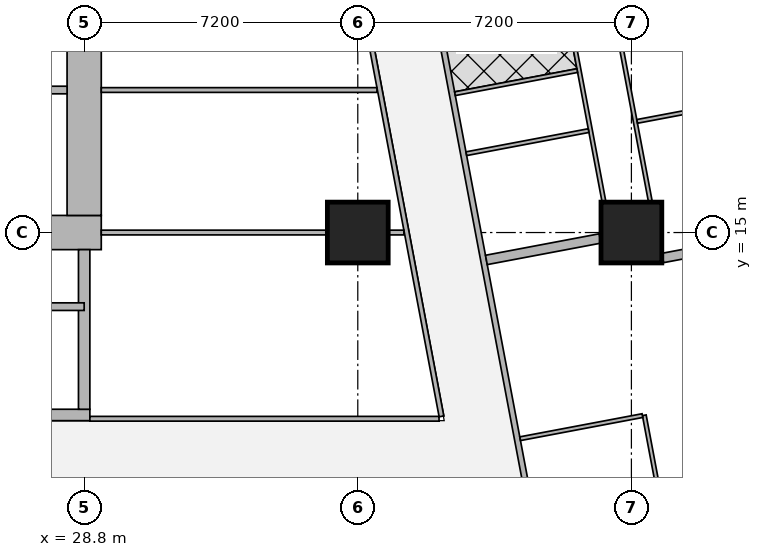
"""IFC4 building model, lengths in metres.
Left out: names, types, materials, properties, quantities, classifications, styles, units other than length and angle.
Written with IfcOpenShell. Run it as: python <this file> out.ifc"""

import sys

from ifc_helpers import new_model, si_unit, direction, frame, frame_2d, origin, origin_2d, place, context, subcontext, project, spatial, rectangle, extrude, element, fill, save


model = new_model("IFC4")
c1 = context("Model", 3, precision=1e-05, world=origin(), true_north=direction((0.0, 1.0)))
c2 = subcontext(c1, "Body", "Model", "MODEL_VIEW")
j1 = project(units=[si_unit("LENGTHUNIT", "METRE"), si_unit("PLANEANGLEUNIT", "RADIAN")], contexts=[c1])
p1 = place(None, origin())
s1 = spatial("IfcSite", under=j1, at=p1, CompositionType="ELEMENT")
p2 = place(p1, origin())
s2 = spatial("IfcBuilding", under=s1, at=p2, CompositionType="ELEMENT")
p3 = place(p2, frame((0.0, 0.0, 81.65)))
s3 = spatial("IfcBuildingStorey", under=s2, at=p3, CompositionType="ELEMENT", Elevation=81.65)
for number, where, z_axis, x_axis in (
    (1, (36.0, 15.0, 0.0), (0.0, 0.0, 1.0), (1.0, 0.0, 0.0)),
    (2, (43.2, 15.0, 0.0), (0.0, 0.0, 1.0), (1.0, 0.0, 0.0)),
):
    element("IfcColumn", number, at=place(p3, frame(where, z_axis=z_axis, x_axis=x_axis)), inside=s3, PredefinedType="COLUMN", context=c2, shape_type="SweptSolid", body=[
        extrude(rectangle(XDim=1.6, YDim=1.6, at=origin_2d()), origin(), (0.0, 0.0, 1.0), 3.75),
    ])
p4 = place(p3, frame((13.95, 15.0, 0.0), z_axis=(0.0, 0.0, 1.0), x_axis=(1.0, 0.0, 0.0)))
e3 = element("IfcWall", 3, at=p4, inside=s3, PredefinedType="SHEAR", context=c2, shape_type="SweptSolid", body=[
    extrude(rectangle(XDim=15.3, YDim=0.9, at=frame_2d((7.65, 0.0))), origin(), (0.0, 0.0, 1.0), 3.75),
])
p5 = place(p4, frame((4.45, 0.0, 0.0)))
e4 = element("IfcOpeningElement", 4, at=p5, cuts=e3, PredefinedType="OPENING", context=c2, shape_type="SweptSolid", body=[
    extrude(rectangle(XDim=1.8, YDim=2.1, at=frame_2d((0.9, 1.05))), frame((0.0, 0.46, 0.0), z_axis=(0.0, -1.0, 0.0), x_axis=(1.0, 0.0, 0.0)), (0.0, 0.0, 1.0), 0.92),
])
p6 = place(p4, frame((10.7, 0.0, 0.0)))
e5 = element("IfcOpeningElement", 5, at=p6, cuts=e3, PredefinedType="OPENING", context=c2, shape_type="SweptSolid", body=[
    extrude(rectangle(XDim=1.1, YDim=2.1, at=frame_2d((0.55, 1.05))), frame((0.0, 0.46, 0.0), z_axis=(0.0, -1.0, 0.0), x_axis=(1.0, 0.0, 0.0)), (0.0, 0.0, 1.0), 0.92),
])
p7 = place(p3, frame((28.8, 15.45, 0.0), z_axis=(0.0, 0.0, 1.0), x_axis=(0.0, 1.0, 0.0)))
e6 = element("IfcWall", 6, at=p7, inside=s3, PredefinedType="SHEAR", context=c2, shape_type="SweptSolid", body=[
    extrude(rectangle(XDim=14.1, YDim=0.9, at=frame_2d((7.05, 0.0))), origin(), (0.0, 0.0, 1.0), 3.75),
])
p8 = place(p3, frame((21.45, 10.2, 0.0), z_axis=(0.0, 0.0, 1.0), x_axis=(1.0, 0.0, 0.0)))
e7 = element("IfcWall", 7, at=p8, inside=s3, PredefinedType="SHEAR", context=c2, shape_type="SweptSolid", body=[
    extrude(rectangle(XDim=7.5, YDim=0.3, at=frame_2d((3.75, 0.0))), origin(), (0.0, 0.0, 1.0), 3.75),
])
p9 = place(p8, frame((0.5, 0.0, 0.0)))
e8 = element("IfcOpeningElement", 8, at=p9, cuts=e7, PredefinedType="OPENING", context=c2, shape_type="SweptSolid", body=[
    extrude(rectangle(XDim=1.1, YDim=2.1, at=frame_2d((0.55, 1.05))), frame((0.0, 0.16, 0.0), z_axis=(0.0, -1.0, 0.0), x_axis=(1.0, 0.0, 0.0)), (0.0, 0.0, 1.0), 0.32),
])
p10 = place(p3, frame((28.8, 10.35, 0.0), z_axis=(0.0, 0.0, 1.0), x_axis=(0.0, 1.0, 0.0)))
e9 = element("IfcWall", 9, at=p10, inside=s3, PredefinedType="SHEAR", context=c2, shape_type="SweptSolid", body=[
    extrude(rectangle(XDim=4.2, YDim=0.3, at=frame_2d((2.1, 0.0))), origin(), (0.0, 0.0, 1.0), 3.75),
])
p11 = place(p3, frame((50.653, 2.703, 0.0), z_axis=(0.0, 0.0, 1.0), x_axis=(-0.185612026696, 0.982623109613, 0.0)))
e10 = element("IfcWall", 10, at=p11, inside=s3, PredefinedType="SOLIDWALL", context=c2, shape_type="SweptSolid", body=[
    extrude(rectangle(XDim=41.393, YDim=0.2, at=frame_2d((20.697, 0.0))), origin(), (0.0, 0.0, 1.0), 3.5),
])
p12 = place(p11, frame((1.633, 0.0, 0.9)))
e11 = element("IfcOpeningElement", 11, at=p12, cuts=e10, PredefinedType="OPENING", context=c2, shape_type="SweptSolid", body=[
    extrude(rectangle(XDim=1.8, YDim=1.5, at=frame_2d((0.9, 0.75))), frame((0.0, 0.11, 0.0), z_axis=(0.0, -1.0, 0.0), x_axis=(1.0, 0.0, 0.0)), (0.0, 0.0, 1.0), 0.22),
])
p13 = place(p11, frame((6.032, 0.0, 0.9)))
e12 = element("IfcOpeningElement", 12, at=p13, cuts=e10, PredefinedType="OPENING", context=c2, shape_type="SweptSolid", body=[
    extrude(rectangle(XDim=1.8, YDim=1.5, at=frame_2d((0.9, 0.75))), frame((0.0, 0.11, 0.0), z_axis=(0.0, -1.0, 0.0), x_axis=(1.0, 0.0, 0.0)), (0.0, 0.0, 1.0), 0.22),
])
p14 = place(p11, frame((9.848, 0.0, 0.9)))
e13 = element("IfcOpeningElement", 13, at=p14, cuts=e10, PredefinedType="OPENING", context=c2, shape_type="SweptSolid", body=[
    extrude(rectangle(XDim=1.8, YDim=1.5, at=frame_2d((0.9, 0.75))), frame((0.0, 0.11, 0.0), z_axis=(0.0, -1.0, 0.0), x_axis=(1.0, 0.0, 0.0)), (0.0, 0.0, 1.0), 0.22),
])
p15 = place(p11, frame((13.664, 0.0, 0.9)))
e14 = element("IfcOpeningElement", 14, at=p15, cuts=e10, PredefinedType="OPENING", context=c2, shape_type="SweptSolid", body=[
    extrude(rectangle(XDim=1.8, YDim=1.5, at=frame_2d((0.9, 0.75))), frame((0.0, 0.11, 0.0), z_axis=(0.0, -1.0, 0.0), x_axis=(1.0, 0.0, 0.0)), (0.0, 0.0, 1.0), 0.22),
])
p16 = place(p11, frame((17.481, 0.0, 0.9)))
e15 = element("IfcOpeningElement", 15, at=p16, cuts=e10, PredefinedType="OPENING", context=c2, shape_type="SweptSolid", body=[
    extrude(rectangle(XDim=1.8, YDim=1.5, at=frame_2d((0.9, 0.75))), frame((0.0, 0.11, 0.0), z_axis=(0.0, -1.0, 0.0), x_axis=(1.0, 0.0, 0.0)), (0.0, 0.0, 1.0), 0.22),
])
p17 = place(p11, frame((21.297, 0.0, 0.9)))
e16 = element("IfcOpeningElement", 16, at=p17, cuts=e10, PredefinedType="OPENING", context=c2, shape_type="SweptSolid", body=[
    extrude(rectangle(XDim=1.8, YDim=1.5, at=frame_2d((0.9, 0.75))), frame((0.0, 0.11, 0.0), z_axis=(0.0, -1.0, 0.0), x_axis=(1.0, 0.0, 0.0)), (0.0, 0.0, 1.0), 0.22),
])
p18 = place(p11, frame((25.113, 0.0, 0.9)))
e17 = element("IfcOpeningElement", 17, at=p18, cuts=e10, PredefinedType="OPENING", context=c2, shape_type="SweptSolid", body=[
    extrude(rectangle(XDim=1.8, YDim=1.5, at=frame_2d((0.9, 0.75))), frame((0.0, 0.11, 0.0), z_axis=(0.0, -1.0, 0.0), x_axis=(1.0, 0.0, 0.0)), (0.0, 0.0, 1.0), 0.22),
])
p19 = place(p11, frame((28.93, 0.0, 0.9)))
e18 = element("IfcOpeningElement", 18, at=p19, cuts=e10, PredefinedType="OPENING", context=c2, shape_type="SweptSolid", body=[
    extrude(rectangle(XDim=1.8, YDim=1.5, at=frame_2d((0.9, 0.75))), frame((0.0, 0.11, 0.0), z_axis=(0.0, -1.0, 0.0), x_axis=(1.0, 0.0, 0.0)), (0.0, 0.0, 1.0), 0.22),
])
p20 = place(p11, frame((32.746, 0.0, 0.9)))
e19 = element("IfcOpeningElement", 19, at=p20, cuts=e10, PredefinedType="OPENING", context=c2, shape_type="SweptSolid", body=[
    extrude(rectangle(XDim=1.8, YDim=1.5, at=frame_2d((0.9, 0.75))), frame((0.0, 0.11, 0.0), z_axis=(0.0, -1.0, 0.0), x_axis=(1.0, 0.0, 0.0)), (0.0, 0.0, 1.0), 0.22),
])
p21 = place(p11, frame((36.481, 0.0, 0.9)))
e20 = element("IfcOpeningElement", 20, at=p21, cuts=e10, PredefinedType="OPENING", context=c2, shape_type="SweptSolid", body=[
    extrude(rectangle(XDim=1.8, YDim=1.5, at=frame_2d((0.9, 0.75))), frame((0.0, 0.11, 0.0), z_axis=(0.0, -1.0, 0.0), x_axis=(1.0, 0.0, 0.0)), (0.0, 0.0, 1.0), 0.22),
])
p22 = place(p3, frame((33.382, 45.65, 0.0), z_axis=(0.0, 0.0, 1.0), x_axis=(0.185593544777, -0.982626600565, 0.0)))
e21 = element("IfcWall", 21, at=p22, inside=s3, PredefinedType="SOLIDWALL", context=c2, shape_type="SweptSolid", body=[
    extrude(rectangle(XDim=47.118, YDim=0.15, at=frame_2d((23.559, 0.0))), origin(), (0.0, 0.0, 1.0), 2.2),
])
p23 = place(p22, frame((19.054, 0.0, 0.0)))
e22 = element("IfcOpeningElement", 22, at=p23, cuts=e21, PredefinedType="OPENING", context=c2, shape_type="SweptSolid", body=[
    extrude(rectangle(XDim=1.0, YDim=2.1, at=frame_2d((0.5, 1.05))), frame((0.0, 0.085, 0.0), z_axis=(0.0, -1.0, 0.0), x_axis=(1.0, 0.0, 0.0)), (0.0, 0.0, 1.0), 0.17),
])
p24 = place(p22, frame((22.87, 0.0, 0.0)))
e23 = element("IfcOpeningElement", 23, at=p24, cuts=e21, PredefinedType="OPENING", context=c2, shape_type="SweptSolid", body=[
    extrude(rectangle(XDim=1.0, YDim=2.1, at=frame_2d((0.5, 1.05))), frame((0.0, 0.085, 0.0), z_axis=(0.0, -1.0, 0.0), x_axis=(1.0, 0.0, 0.0)), (0.0, 0.0, 1.0), 0.17),
])
p25 = place(p22, frame((33.833, 0.0, 0.0)))
e24 = element("IfcOpeningElement", 24, at=p25, cuts=e21, PredefinedType="OPENING", context=c2, shape_type="SweptSolid", body=[
    extrude(rectangle(XDim=1.0, YDim=2.1, at=frame_2d((0.5, 1.05))), frame((0.0, 0.085, 0.0), z_axis=(0.0, -1.0, 0.0), x_axis=(1.0, 0.0, 0.0)), (0.0, 0.0, 1.0), 0.17),
])
p26 = place(p3, frame((42.566, 21.809, 0.0), z_axis=(0.0, 0.0, 1.0), x_axis=(0.18559218796, -0.982626856832, 0.0)))
e25 = element("IfcWall", 25, at=p26, inside=s3, PredefinedType="PARTITIONING", context=c2, shape_type="SweptSolid", body=[
    extrude(rectangle(XDim=6.105, YDim=0.1, at=frame_2d((3.052, 0.0))), origin(), (0.0, 0.0, 1.0), 2.5),
])
p27 = place(p26, frame((1.45, 0.0, 0.0)))
e26 = element("IfcOpeningElement", 26, at=p27, cuts=e25, PredefinedType="OPENING", context=c2, shape_type="SweptSolid", body=[
    extrude(rectangle(XDim=0.9, YDim=2.1, at=frame_2d((0.45, 1.05))), frame((0.0, 0.06, 0.0), z_axis=(0.0, -1.0, 0.0), x_axis=(1.0, 0.0, 0.0)), (0.0, 0.0, 1.0), 0.12),
])
p28 = place(p26, frame((4.163, 0.0, 0.0)))
e27 = element("IfcOpeningElement", 27, at=p28, cuts=e25, PredefinedType="OPENING", context=c2, shape_type="SweptSolid", body=[
    extrude(rectangle(XDim=0.9, YDim=2.1, at=frame_2d((0.45, 1.05))), frame((0.0, 0.06, 0.0), z_axis=(0.0, -1.0, 0.0), x_axis=(1.0, 0.0, 0.0)), (0.0, 0.0, 1.0), 0.12),
])
p29 = place(p3, frame((41.414, 21.442, 0.0), z_axis=(0.0, 0.0, 1.0), x_axis=(0.185636022079, -0.982618576716, 0.0)))
e28 = element("IfcWall", 28, at=p29, inside=s3, PredefinedType="PARTITIONING", context=c2, shape_type="SweptSolid", body=[
    extrude(rectangle(XDim=5.731, YDim=0.1, at=frame_2d((2.866, 0.0))), origin(), (0.0, 0.0, 1.0), 3.5),
])
p30 = place(p29, frame((0.655, 0.0, 0.0)))
e29 = element("IfcOpeningElement", 29, at=p30, cuts=e28, PredefinedType="OPENING", context=c2, shape_type="SweptSolid", body=[
    extrude(rectangle(XDim=0.9, YDim=2.1, at=frame_2d((0.45, 1.05))), frame((0.0, 0.06, 0.0), z_axis=(0.0, -1.0, 0.0), x_axis=(1.0, 0.0, 0.0)), (0.0, 0.0, 1.0), 0.12),
])
p31 = place(p29, frame((2.563, 0.0, 0.0)))
e30 = element("IfcOpeningElement", 30, at=p31, cuts=e28, PredefinedType="OPENING", context=c2, shape_type="SweptSolid", body=[
    extrude(rectangle(XDim=0.9, YDim=2.1, at=frame_2d((0.45, 1.05))), frame((0.0, 0.06, 0.0), z_axis=(0.0, -1.0, 0.0), x_axis=(1.0, 0.0, 0.0)), (0.0, 0.0, 1.0), 0.12),
])
p32 = place(p3, frame((47.527, 18.712, 0.0), z_axis=(0.0, 0.0, 1.0), x_axis=(-0.982665405803, -0.185387972203, 0.0)))
e31 = element("IfcWall", 31, at=p32, inside=s3, PredefinedType="PARTITIONING", context=c2, shape_type="SweptSolid", body=[
    extrude(rectangle(XDim=4.25, YDim=0.1, at=frame_2d((2.125, 0.0))), origin(), (0.0, 0.0, 1.0), 2.2),
])
p33 = place(p3, frame((42.073, 17.682, 0.0), z_axis=(0.0, 0.0, 1.0), x_axis=(-0.982610347627, -0.185679575441, 0.0)))
e32 = element("IfcWall", 32, at=p33, inside=s3, PredefinedType="PARTITIONING", context=c2, shape_type="SweptSolid", body=[
    extrude(rectangle(XDim=3.274, YDim=0.1, at=frame_2d((1.637, 0.0))), origin(), (0.0, 0.0, 1.0), 3.5),
])
p34 = place(p33, frame((1.2, 0.0, 0.0)))
e33 = element("IfcOpeningElement", 33, at=p34, cuts=e32, PredefinedType="OPENING", context=c2, shape_type="SweptSolid", body=[
    extrude(rectangle(XDim=0.9, YDim=2.1, at=frame_2d((0.45, 1.05))), frame((0.0, 0.06, 0.0), z_axis=(0.0, -1.0, 0.0), x_axis=(1.0, 0.0, 0.0)), (0.0, 0.0, 1.0), 0.12),
])
p35 = place(p3, frame((41.775, 19.261, 0.0), z_axis=(0.0, 0.0, 1.0), x_axis=(-0.982620626894, -0.185625169636, 0.0)))
e34 = element("IfcWall", 34, at=p35, inside=s3, PredefinedType="PARTITIONING", context=c2, shape_type="SweptSolid", body=[
    extrude(rectangle(XDim=3.275, YDim=0.1, at=frame_2d((1.637, 0.0))), origin(), (0.0, 0.0, 1.0), 3.5),
])
p36 = place(p3, frame((43.539, 10.192, 0.0), z_axis=(0.0, 0.0, 1.0), x_axis=(0.185366049966, -0.982669541362, 0.0)))
e35 = element("IfcWall", 35, at=p36, inside=s3, PredefinedType="PARTITIONING", context=c2, shape_type="SweptSolid", body=[
    extrude(rectangle(XDim=1.915, YDim=0.1, at=frame_2d((0.958, 0.0))), origin(), (0.0, 0.0, 1.0), 3.5),
])
p37 = place(p3, frame((43.49, 10.183, 0.0), z_axis=(0.0, 0.0, 1.0), x_axis=(-0.982607026909, -0.185697147715, 0.0)))
e36 = element("IfcWall", 36, at=p37, inside=s3, PredefinedType="PARTITIONING", context=c2, shape_type="SweptSolid", body=[
    extrude(rectangle(XDim=3.275, YDim=0.1, at=frame_2d((1.637, 0.0))), origin(), (0.0, 0.0, 1.0), 3.5),
])
p38 = place(p37, frame((1.2, 0.0, 0.0)))
e37 = element("IfcOpeningElement", 37, at=p38, cuts=e36, PredefinedType="OPENING", context=c2, shape_type="SweptSolid", body=[
    extrude(rectangle(XDim=0.9, YDim=2.1, at=frame_2d((0.45, 1.05))), frame((0.0, 0.06, 0.0), z_axis=(0.0, -1.0, 0.0), x_axis=(1.0, 0.0, 0.0)), (0.0, 0.0, 1.0), 0.12),
])
p39 = place(p3, frame((45.19, 14.55, 0.0), z_axis=(0.0, 0.0, 1.0), x_axis=(-0.982666604435, -0.185381618634, 0.0)))
e38 = element("IfcWall", 38, at=p39, inside=s3, PredefinedType="SOLIDWALL", context=c2, shape_type="SweptSolid", body=[
    extrude(rectangle(XDim=1.187, YDim=0.25, at=frame_2d((0.593, 0.0))), origin(), (0.0, 0.0, 1.0), 3.5),
])
p40 = place(p3, frame((42.376, 14.844, 0.0), z_axis=(0.0, 0.0, 1.0), x_axis=(-0.982636286056, -0.185542257522, 0.0)))
e39 = element("IfcWall", 39, at=p40, inside=s3, PredefinedType="SOLIDWALL", context=c2, shape_type="SweptSolid", body=[
    extrude(rectangle(XDim=3.045, YDim=0.25, at=frame_2d((1.522, 0.0))), origin(), (0.0, 0.0, 1.0), 3.5),
])
p41 = place(p3, frame((28.95, 10.1, 0.0), z_axis=(0.0, 0.0, 1.0), x_axis=(1.0, 0.0, 0.0)))
e40 = element("IfcWall", 40, at=p41, inside=s3, PredefinedType="PARTITIONING", context=c2, shape_type="SweptSolid", body=[
    extrude(rectangle(XDim=9.188, YDim=0.125, at=frame_2d((4.594, 0.0))), origin(), (0.0, 0.0, 1.0), 3.5),
])
p42 = place(p3, frame((38.202, 10.163, 0.0), z_axis=(0.0, 0.0, 1.0), x_axis=(-0.185645577403, 0.982616771479, 0.0)))
e41 = element("IfcWall", 41, at=p42, inside=s3, PredefinedType="PARTITIONING", context=c2, shape_type="SweptSolid", body=[
    extrude(rectangle(XDim=12.555, YDim=0.125, at=frame_2d((6.278, 0.0))), origin(), (0.0, 0.0, 1.0), 2.5),
])
p43 = place(p42, frame((0.708, 0.0, 0.0)))
e42 = element("IfcOpeningElement", 42, at=p43, cuts=e41, PredefinedType="OPENING", context=c2, shape_type="SweptSolid", body=[
    extrude(rectangle(XDim=1.0, YDim=2.1, at=frame_2d((0.5, 1.05))), frame((0.0, 0.073, 0.0), z_axis=(0.0, -1.0, 0.0), x_axis=(1.0, 0.0, 0.0)), (0.0, 0.0, 1.0), 0.145),
])
p44 = place(p42, frame((6.0, 0.0, 0.0)))
e43 = element("IfcOpeningElement", 43, at=p44, cuts=e41, PredefinedType="OPENING", context=c2, shape_type="SweptSolid", body=[
    extrude(rectangle(XDim=1.0, YDim=2.1, at=frame_2d((0.5, 1.05))), frame((0.0, 0.073, 0.0), z_axis=(0.0, -1.0, 0.0), x_axis=(1.0, 0.0, 0.0)), (0.0, 0.0, 1.0), 0.145),
])
p45 = place(p42, frame((9.562, 0.0, 0.0)))
e44 = element("IfcOpeningElement", 44, at=p45, cuts=e41, PredefinedType="OPENING", context=c2, shape_type="SweptSolid", body=[
    extrude(rectangle(XDim=1.0, YDim=2.1, at=frame_2d((0.5, 1.05))), frame((0.0, 0.073, 0.0), z_axis=(0.0, -1.0, 0.0), x_axis=(1.0, 0.0, 0.0)), (0.0, 0.0, 1.0), 0.145),
])
p46 = place(p3, frame((29.25, 15.0, 0.0), z_axis=(0.0, 0.0, 1.0), x_axis=(1.0, 0.0, 0.0)))
e45 = element("IfcWall", 45, at=p46, inside=s3, PredefinedType="PARTITIONING", context=c2, shape_type="SweptSolid", body=[
    extrude(rectangle(XDim=5.949, YDim=0.125, at=frame_2d((2.975, 0.0))), origin(), (0.0, 0.0, 1.0), 3.5),
])
p47 = place(p3, frame((36.801, 15.0, 0.0), z_axis=(0.0, 0.0, 1.0), x_axis=(1.0, 0.0, 0.0)))
e46 = element("IfcWall", 46, at=p47, inside=s3, PredefinedType="PARTITIONING", context=c2, shape_type="SweptSolid", body=[
    extrude(rectangle(XDim=0.412, YDim=0.125, at=frame_2d((0.206, 0.0))), origin(), (0.0, 0.0, 1.0), 3.5),
])
p48 = place(p3, frame((29.25, 18.75, 0.0), z_axis=(0.0, 0.0, 1.0), x_axis=(1.0, 0.0, 0.0)))
e47 = element("IfcWall", 47, at=p48, inside=s3, PredefinedType="PARTITIONING", context=c2, shape_type="SweptSolid", body=[
    extrude(rectangle(XDim=7.254, YDim=0.125, at=frame_2d((3.627, 0.0))), origin(), (0.0, 0.0, 1.0), 3.5),
])
p49 = place(p3, frame((23.0, 13.05, 0.0), z_axis=(0.0, 0.0, 1.0), x_axis=(1.0, 0.0, 0.0)))
e48 = element("IfcWall", 48, at=p49, inside=s3, PredefinedType="SHEAR", context=c2, shape_type="SweptSolid", body=[
    extrude(rectangle(XDim=5.8, YDim=0.2, at=frame_2d((2.9, 0.0))), origin(), (0.0, 0.0, 1.0), 3.75),
])
p50 = place(p3, frame((27.4, 18.75, 0.0), z_axis=(0.0, 0.0, 1.0), x_axis=(1.0, 0.0, 0.0)))
e49 = element("IfcWall", 49, at=p50, inside=s3, PredefinedType="SOLIDWALL", context=c2, shape_type="SweptSolid", body=[
    extrude(rectangle(XDim=0.95, YDim=0.2, at=frame_2d((0.475, 0.0))), origin(), (0.0, 0.0, 1.0), 3.5),
])
p51 = place(p27, origin())
e50 = element("IfcDoor", 50, at=p51, inside=s3, OperationType="SINGLE_SWING_LEFT", PredefinedType="DOOR", context=c2, shape_type="SweptSolid", body=[
    extrude(rectangle(XDim=0.9, YDim=2.1, at=frame_2d((0.45, 1.05))), frame((0.0, 0.025, 0.0), z_axis=(0.0, -1.0, 0.0), x_axis=(1.0, 0.0, 0.0)), (0.0, 0.0, 1.0), 0.05),
])
fill(e26, e50)
p52 = place(p28, origin())
e51 = element("IfcDoor", 51, at=p52, inside=s3, OperationType="SINGLE_SWING_LEFT", PredefinedType="DOOR", context=c2, shape_type="SweptSolid", body=[
    extrude(rectangle(XDim=0.9, YDim=2.1, at=frame_2d((0.45, 1.05))), frame((0.0, 0.025, 0.0), z_axis=(0.0, -1.0, 0.0), x_axis=(1.0, 0.0, 0.0)), (0.0, 0.0, 1.0), 0.05),
])
fill(e27, e51)
p53 = place(p31, origin())
e52 = element("IfcDoor", 52, at=p53, inside=s3, OperationType="SINGLE_SWING_RIGHT", PredefinedType="DOOR", context=c2, shape_type="SweptSolid", body=[
    extrude(rectangle(XDim=0.9, YDim=2.1, at=frame_2d((0.45, 1.05))), frame((0.0, 0.025, 0.0), z_axis=(0.0, -1.0, 0.0), x_axis=(1.0, 0.0, 0.0)), (0.0, 0.0, 1.0), 0.05),
])
fill(e30, e52)
p54 = place(p25, origin())
e53 = element("IfcDoor", 53, at=p54, inside=s3, OperationType="SINGLE_SWING_LEFT", PredefinedType="DOOR", context=c2, shape_type="SweptSolid", body=[
    extrude(rectangle(XDim=1.0, YDim=2.1, at=frame_2d((0.5, 1.05))), frame((0.0, 0.025, 0.0), z_axis=(0.0, -1.0, 0.0), x_axis=(1.0, 0.0, 0.0)), (0.0, 0.0, 1.0), 0.05),
])
fill(e24, e53)
p55 = place(p38, origin())
e54 = element("IfcDoor", 54, at=p55, inside=s3, OperationType="SINGLE_SWING_RIGHT", PredefinedType="DOOR", context=c2, shape_type="SweptSolid", body=[
    extrude(rectangle(XDim=0.9, YDim=2.1, at=frame_2d((0.45, 1.05))), frame((0.0, 0.025, 0.0), z_axis=(0.0, -1.0, 0.0), x_axis=(1.0, 0.0, 0.0)), (0.0, 0.0, 1.0), 0.05),
])
fill(e37, e54)
p56 = place(p34, origin())
e55 = element("IfcDoor", 55, at=p56, inside=s3, OperationType="SINGLE_SWING_RIGHT", PredefinedType="DOOR", context=c2, shape_type="SweptSolid", body=[
    extrude(rectangle(XDim=0.9, YDim=2.1, at=frame_2d((0.45, 1.05))), frame((0.0, 0.025, 0.0), z_axis=(0.0, -1.0, 0.0), x_axis=(1.0, 0.0, 0.0)), (0.0, 0.0, 1.0), 0.05),
])
fill(e33, e55)
p57 = place(p43, origin())
e56 = element("IfcDoor", 56, at=p57, inside=s3, OperationType="SINGLE_SWING_LEFT", PredefinedType="DOOR", context=c2, shape_type="SweptSolid", body=[
    extrude(rectangle(XDim=1.0, YDim=2.1, at=frame_2d((0.5, 1.05))), frame((0.0, 0.025, 0.0), z_axis=(0.0, -1.0, 0.0), x_axis=(1.0, 0.0, 0.0)), (0.0, 0.0, 1.0), 0.05),
])
fill(e42, e56)
p58 = place(p44, origin())
e57 = element("IfcDoor", 57, at=p58, inside=s3, OperationType="SINGLE_SWING_LEFT", PredefinedType="DOOR", context=c2, shape_type="SweptSolid", body=[
    extrude(rectangle(XDim=1.0, YDim=2.1, at=frame_2d((0.5, 1.05))), frame((0.0, 0.025, 0.0), z_axis=(0.0, -1.0, 0.0), x_axis=(1.0, 0.0, 0.0)), (0.0, 0.0, 1.0), 0.05),
])
fill(e43, e57)
p59 = place(p45, origin())
e58 = element("IfcDoor", 58, at=p59, inside=s3, OperationType="SINGLE_SWING_LEFT", PredefinedType="DOOR", context=c2, shape_type="SweptSolid", body=[
    extrude(rectangle(XDim=1.0, YDim=2.1, at=frame_2d((0.5, 1.05))), frame((0.0, 0.025, 0.0), z_axis=(0.0, -1.0, 0.0), x_axis=(1.0, 0.0, 0.0)), (0.0, 0.0, 1.0), 0.05),
])
fill(e44, e58)
save(model, sys.argv[1])
